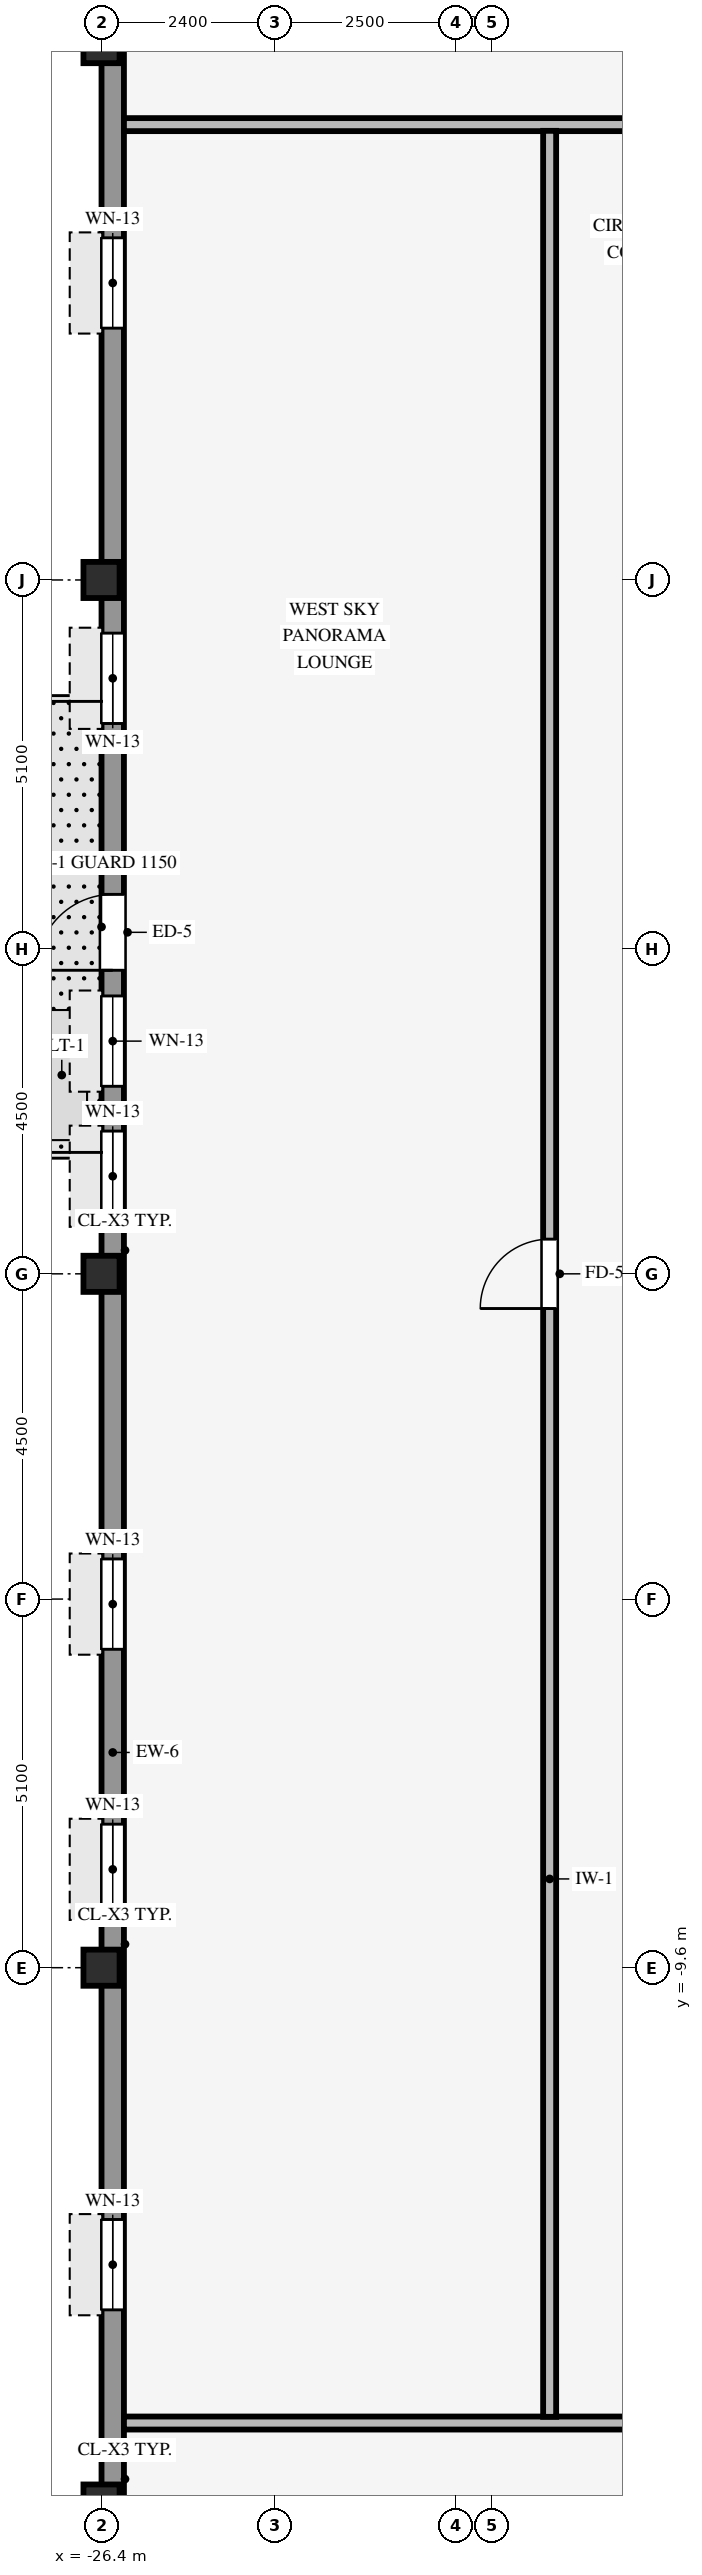
"""IFC4 building model, lengths in metres.
Left out: names, types, materials, properties, quantities, classifications, styles, units other than length and angle.
Written with IfcOpenShell. Run it as: python <this file> out.ifc"""

import sys

from ifc_helpers import new_model, si_unit, direction, frame, frame_2d, origin, origin_2d, place, context, subcontext, project, spatial, rectangle, hollow_rectangle, extrude, source, transform, mapped, element, fill, save


model = new_model("IFC4")
c1 = context("Model", 3, precision=1e-05, world=origin(), true_north=direction((0.0, 1.0)))
c2 = subcontext(c1, "Body", "Model", "MODEL_VIEW")
j1 = project(units=[si_unit("LENGTHUNIT", "METRE"), si_unit("PLANEANGLEUNIT", "RADIAN")], contexts=[c1])
p1 = place(None, origin())
s1 = spatial("IfcSite", under=j1, at=p1, CompositionType="ELEMENT")
p2 = place(p1, origin())
s2 = spatial("IfcBuilding", under=s1, at=p2, CompositionType="ELEMENT")
p3 = place(p2, frame((0.0, 0.0, 223.75)))
s3 = spatial("IfcBuildingStorey", under=s2, at=p3, CompositionType="ELEMENT", Elevation=223.75)
for number, where, z_axis, x_axis in (
    (1, (-26.4, -17.0, 0.0), (0.0, 0.0, 1.0), (1.0, 0.0, 0.0)),
    (2, (-26.4, -9.6, 0.0), (0.0, 0.0, 1.0), (1.0, 0.0, 0.0)),
    (3, (-26.4, 0.0, 0.0), (0.0, 0.0, 1.0), (1.0, 0.0, 0.0)),
    (4, (-26.4, 9.6, 0.0), (0.0, 0.0, 1.0), (1.0, 0.0, 0.0)),
    (5, (-26.4, 17.0, 0.0), (0.0, 0.0, 1.0), (1.0, 0.0, 0.0)),
):
    element("IfcColumn", number, at=place(p3, frame(where, z_axis=z_axis, x_axis=x_axis)), inside=s3, PredefinedType="COLUMN", context=c2, shape_type="SweptSolid", body=[
        extrude(hollow_rectangle(XDim=0.5, YDim=0.5, WallThickness=0.032, InnerFilletRadius=0.032, OuterFilletRadius=0.064, at=origin_2d()), origin(), (0.0, 0.0, 1.0), 3.37),
    ])
p4 = place(p3, frame((-26.245, -16.994, 0.0), z_axis=(0.0, 0.0, 1.0), x_axis=(0.0, 1.0, 0.0)))
e6 = element("IfcWall", 6, at=p4, inside=s3, PredefinedType="STANDARD", context=c2, shape_type="SweptSolid", body=[
    extrude(rectangle(XDim=33.988, YDim=0.31, at=frame_2d((16.994, 0.0))), origin(), (0.0, 0.0, 1.0), 2.705),
])
p5 = place(p4, frame((21.194, 0.0, 0.0)))
e7 = element("IfcOpeningElement", 7, at=p5, cuts=e6, PredefinedType="OPENING", context=c2, shape_type="SweptSolid", body=[
    extrude(rectangle(XDim=1.05, YDim=2.1, at=frame_2d((0.525, 1.05))), frame((0.0, 0.165, 0.0), z_axis=(0.0, -1.0, 0.0), x_axis=(1.0, 0.0, 0.0)), (0.0, 0.0, 1.0), 0.33),
])
p6 = place(p4, frame((2.66, 0.0, 0.8)))
e8 = element("IfcOpeningElement", 8, at=p6, cuts=e6, PredefinedType="OPENING", context=c2, shape_type="SweptSolid", body=[
    extrude(rectangle(XDim=1.25, YDim=1.52, at=frame_2d((0.625, 0.76))), frame((0.0, 0.165, 0.0), z_axis=(0.0, -1.0, 0.0), x_axis=(1.0, 0.0, 0.0)), (0.0, 0.0, 1.0), 0.33),
])
p7 = place(p4, frame((8.13, 0.0, 0.8)))
e9 = element("IfcOpeningElement", 9, at=p7, cuts=e6, PredefinedType="OPENING", context=c2, shape_type="SweptSolid", body=[
    extrude(rectangle(XDim=1.25, YDim=1.52, at=frame_2d((0.625, 0.76))), frame((0.0, 0.165, 0.0), z_axis=(0.0, -1.0, 0.0), x_axis=(1.0, 0.0, 0.0)), (0.0, 0.0, 1.0), 0.33),
])
p8 = place(p4, frame((11.799, 0.0, 0.8)))
e10 = element("IfcOpeningElement", 10, at=p8, cuts=e6, PredefinedType="OPENING", context=c2, shape_type="SweptSolid", body=[
    extrude(rectangle(XDim=1.25, YDim=1.52, at=frame_2d((0.625, 0.76))), frame((0.0, 0.165, 0.0), z_axis=(0.0, -1.0, 0.0), x_axis=(1.0, 0.0, 0.0)), (0.0, 0.0, 1.0), 0.33),
])
p9 = place(p4, frame((17.719, 0.0, 0.8)))
e11 = element("IfcOpeningElement", 11, at=p9, cuts=e6, PredefinedType="OPENING", context=c2, shape_type="SweptSolid", body=[
    extrude(rectangle(XDim=1.25, YDim=1.52, at=frame_2d((0.625, 0.76))), frame((0.0, 0.165, 0.0), z_axis=(0.0, -1.0, 0.0), x_axis=(1.0, 0.0, 0.0)), (0.0, 0.0, 1.0), 0.33),
])
p10 = place(p4, frame((19.589, 0.0, 0.8)))
e12 = element("IfcOpeningElement", 12, at=p10, cuts=e6, PredefinedType="OPENING", context=c2, shape_type="SweptSolid", body=[
    extrude(rectangle(XDim=1.25, YDim=1.52, at=frame_2d((0.625, 0.76))), frame((0.0, 0.165, 0.0), z_axis=(0.0, -1.0, 0.0), x_axis=(1.0, 0.0, 0.0)), (0.0, 0.0, 1.0), 0.33),
])
p11 = place(p4, frame((24.608, 0.0, 0.8)))
e13 = element("IfcOpeningElement", 13, at=p11, cuts=e6, PredefinedType="OPENING", context=c2, shape_type="SweptSolid", body=[
    extrude(rectangle(XDim=1.25, YDim=1.52, at=frame_2d((0.625, 0.76))), frame((0.0, 0.165, 0.0), z_axis=(0.0, -1.0, 0.0), x_axis=(1.0, 0.0, 0.0)), (0.0, 0.0, 1.0), 0.33),
])
p12 = place(p4, frame((30.078, 0.0, 0.8)))
e14 = element("IfcOpeningElement", 14, at=p12, cuts=e6, PredefinedType="OPENING", context=c2, shape_type="SweptSolid", body=[
    extrude(rectangle(XDim=1.25, YDim=1.52, at=frame_2d((0.625, 0.76))), frame((0.0, 0.165, 0.0), z_axis=(0.0, -1.0, 0.0), x_axis=(1.0, 0.0, 0.0)), (0.0, 0.0, 1.0), 0.33),
])
p13 = place(p3, frame((-26.09, -15.9, 0.0), z_axis=(0.0, 0.0, 1.0), x_axis=(1.0, 0.0, 0.0)))
e15 = element("IfcWall", 15, at=p13, inside=s3, PredefinedType="PARTITIONING", context=c2, shape_type="SweptSolid", body=[
    extrude(rectangle(XDim=35.09, YDim=0.18, at=frame_2d((17.545, 0.0))), origin(), (0.0, 0.0, 1.0), 3.36),
])
p14 = place(p13, frame((17.51, 0.0, 0.0)))
e16 = element("IfcOpeningElement", 16, at=p14, cuts=e15, PredefinedType="OPENING", context=c2, shape_type="SweptSolid", body=[
    extrude(rectangle(XDim=0.96, YDim=2.1, at=frame_2d((0.48, 1.05))), frame((0.0, 0.1, 0.0), z_axis=(0.0, -1.0, 0.0), x_axis=(1.0, 0.0, 0.0)), (0.0, 0.0, 1.0), 0.2),
])
p15 = place(p13, frame((28.91, 0.0, 0.0)))
e17 = element("IfcOpeningElement", 17, at=p15, cuts=e15, PredefinedType="OPENING", context=c2, shape_type="SweptSolid", body=[
    extrude(rectangle(XDim=0.96, YDim=2.1, at=frame_2d((0.48, 1.05))), frame((0.0, 0.1, 0.0), z_axis=(0.0, -1.0, 0.0), x_axis=(1.0, 0.0, 0.0)), (0.0, 0.0, 1.0), 0.2),
])
p16 = place(p3, frame((-26.09, 15.9, 0.0), z_axis=(0.0, 0.0, 1.0), x_axis=(1.0, 0.0, 0.0)))
e18 = element("IfcWall", 18, at=p16, inside=s3, PredefinedType="PARTITIONING", context=c2, shape_type="SweptSolid", body=[
    extrude(rectangle(XDim=35.09, YDim=0.18, at=frame_2d((17.545, 0.0))), origin(), (0.0, 0.0, 1.0), 3.36),
])
p17 = place(p16, frame((17.76, 0.0, 0.0)))
e19 = element("IfcOpeningElement", 19, at=p17, cuts=e18, PredefinedType="OPENING", context=c2, shape_type="SweptSolid", body=[
    extrude(rectangle(XDim=0.96, YDim=2.1, at=frame_2d((0.48, 1.05))), frame((0.0, 0.1, 0.0), z_axis=(0.0, -1.0, 0.0), x_axis=(1.0, 0.0, 0.0)), (0.0, 0.0, 1.0), 0.2),
])
p18 = place(p16, frame((29.91, 0.0, 0.0)))
e20 = element("IfcOpeningElement", 20, at=p18, cuts=e18, PredefinedType="OPENING", context=c2, shape_type="SweptSolid", body=[
    extrude(rectangle(XDim=0.96, YDim=2.1, at=frame_2d((0.48, 1.05))), frame((0.0, 0.1, 0.0), z_axis=(0.0, -1.0, 0.0), x_axis=(1.0, 0.0, 0.0)), (0.0, 0.0, 1.0), 0.2),
])
p19 = place(p3, frame((-20.2, -15.814, 0.0), z_axis=(0.0, 0.0, 1.0), x_axis=(0.0, 1.0, 0.0)))
e21 = element("IfcWall", 21, at=p19, inside=s3, PredefinedType="PARTITIONING", context=c2, shape_type="SweptSolid", body=[
    extrude(rectangle(XDim=31.628, YDim=0.18, at=frame_2d((15.814, 0.0))), origin(), (0.0, 0.0, 1.0), 3.36),
])
p20 = place(p19, frame((15.334, 0.0, 0.0)))
e22 = element("IfcOpeningElement", 22, at=p20, cuts=e21, PredefinedType="OPENING", context=c2, shape_type="SweptSolid", body=[
    extrude(rectangle(XDim=0.96, YDim=2.1, at=frame_2d((0.48, 1.05))), frame((0.0, 0.1, 0.0), z_axis=(0.0, -1.0, 0.0), x_axis=(1.0, 0.0, 0.0)), (0.0, 0.0, 1.0), 0.2),
])
m1 = source(origin(), c2, "Body", "SweptSolid", [
    extrude(rectangle(XDim=1.05, YDim=2.1, at=frame_2d((0.525, 1.05))), frame((0.0, 0.025, 0.0), z_axis=(0.0, -1.0, 0.0), x_axis=(1.0, 0.0, 0.0)), (0.0, 0.0, 1.0), 0.05),
])
p21 = place(p5, origin())
e23 = element("IfcDoor", 23, at=p21, inside=s3, OperationType="SINGLE_SWING_LEFT", PredefinedType="DOOR", context=c2, shape_type="MappedRepresentation", body=[
    mapped(m1, transform((0.0, 0.0, 0.0), scale=1.0)),
])
fill(e7, e23)
m2 = source(origin(), c2, "Body", "SweptSolid", [
    extrude(rectangle(XDim=1.25, YDim=1.52, at=frame_2d((0.625, 0.76))), frame((0.0, 0.03, 0.0), z_axis=(0.0, -1.0, 0.0), x_axis=(1.0, 0.0, 0.0)), (0.0, 0.0, 1.0), 0.06),
])
p22 = place(p6, origin())
e24 = element("IfcWindow", 24, at=p22, inside=s3, PartitioningType="SINGLE_PANEL", PredefinedType="WINDOW", context=c2, shape_type="MappedRepresentation", body=[
    mapped(m2, transform((0.0, 0.0, 0.0), scale=1.0)),
])
fill(e8, e24)
p23 = place(p7, origin())
e25 = element("IfcWindow", 25, at=p23, inside=s3, PartitioningType="SINGLE_PANEL", PredefinedType="WINDOW", context=c2, shape_type="MappedRepresentation", body=[
    mapped(m2, transform((0.0, 0.0, 0.0), scale=1.0)),
])
fill(e9, e25)
p24 = place(p8, origin())
e26 = element("IfcWindow", 26, at=p24, inside=s3, PartitioningType="SINGLE_PANEL", PredefinedType="WINDOW", context=c2, shape_type="MappedRepresentation", body=[
    mapped(m2, transform((0.0, 0.0, 0.0), scale=1.0)),
])
fill(e10, e26)
p25 = place(p9, origin())
e27 = element("IfcWindow", 27, at=p25, inside=s3, PartitioningType="SINGLE_PANEL", PredefinedType="WINDOW", context=c2, shape_type="MappedRepresentation", body=[
    mapped(m2, transform((0.0, 0.0, 0.0), scale=1.0)),
])
fill(e11, e27)
p26 = place(p10, origin())
e28 = element("IfcWindow", 28, at=p26, inside=s3, PartitioningType="SINGLE_PANEL", PredefinedType="WINDOW", context=c2, shape_type="MappedRepresentation", body=[
    mapped(m2, transform((0.0, 0.0, 0.0), scale=1.0)),
])
fill(e12, e28)
p27 = place(p11, origin())
e29 = element("IfcWindow", 29, at=p27, inside=s3, PartitioningType="SINGLE_PANEL", PredefinedType="WINDOW", context=c2, shape_type="MappedRepresentation", body=[
    mapped(m2, transform((0.0, 0.0, 0.0), scale=1.0)),
])
fill(e13, e29)
p28 = place(p12, origin())
e30 = element("IfcWindow", 30, at=p28, inside=s3, PartitioningType="SINGLE_PANEL", PredefinedType="WINDOW", context=c2, shape_type="MappedRepresentation", body=[
    mapped(m2, transform((0.0, 0.0, 0.0), scale=1.0)),
])
fill(e14, e30)
m3 = source(origin(), c2, "Body", "SweptSolid", [
    extrude(rectangle(XDim=0.96, YDim=2.1, at=frame_2d((0.48, 1.05))), frame((0.0, 0.025, 0.0), z_axis=(0.0, -1.0, 0.0), x_axis=(1.0, 0.0, 0.0)), (0.0, 0.0, 1.0), 0.05),
])
p29 = place(p20, origin())
e31 = element("IfcDoor", 31, at=p29, inside=s3, OperationType="SINGLE_SWING_LEFT", PredefinedType="DOOR", context=c2, shape_type="MappedRepresentation", body=[
    mapped(m3, transform((0.0, 0.0, 0.0), scale=1.0)),
])
fill(e22, e31)
save(model, sys.argv[1])
